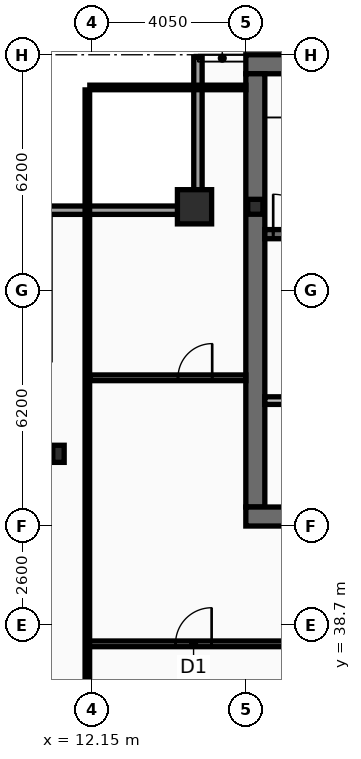
"""IFC4 building model, lengths in metres.
Left out: names, types, materials, properties, quantities, classifications, styles, units other than length and angle.
Written with IfcOpenShell. Run it as: python <this file> out.ifc"""

import sys

from ifc_helpers import new_model, si_unit, direction, frame, frame_2d, origin, origin_2d, place, context, subcontext, project, spatial, rectangle, hollow_rectangle, i_section, extrude, element, fill, save


model = new_model("IFC4")
c1 = context("Model", 3, precision=1e-05, world=origin(), true_north=direction((0.0, 1.0)))
c2 = subcontext(c1, "Body", "Model", "MODEL_VIEW")
j1 = project(units=[si_unit("LENGTHUNIT", "METRE"), si_unit("PLANEANGLEUNIT", "RADIAN")], contexts=[c1])
p1 = place(None, origin())
s1 = spatial("IfcSite", under=j1, at=p1, CompositionType="ELEMENT")
p2 = place(p1, origin())
s2 = spatial("IfcBuilding", under=s1, at=p2, CompositionType="ELEMENT")
p3 = place(p2, frame((0.0, 0.0, 339.8)))
s3 = spatial("IfcBuildingStorey", under=s2, at=p3, CompositionType="ELEMENT", Elevation=339.8)
p4 = place(p3, frame((16.2, 53.45, 0.0), z_axis=(0.0, 0.0, 1.0), x_axis=(1.0, 0.0, 0.0)))
e1 = element("IfcWall", 1, at=p4, inside=s3, PredefinedType="SHEAR", context=c2, shape_type="SweptSolid", body=[
    extrude(rectangle(XDim=40.5, YDim=0.5, at=frame_2d((20.25, 0.0))), origin(), (0.0, 0.0, 1.0), 3.44),
])
p5 = place(p3, frame((16.45, 41.8, 0.0), z_axis=(0.0, 0.0, 1.0), x_axis=(0.0, 1.0, 0.0)))
e2 = element("IfcWall", 2, at=p5, inside=s3, PredefinedType="SHEAR", context=c2, shape_type="SweptSolid", body=[
    extrude(rectangle(XDim=11.4, YDim=0.5, at=frame_2d((5.7, 0.0))), origin(), (0.0, 0.0, 1.0), 3.44),
])
p6 = place(p3, frame((18.65, 41.55, 0.0), z_axis=(0.0, 0.0, 1.0), x_axis=(-1.0, 0.0, 0.0)))
e3 = element("IfcWall", 3, at=p6, inside=s3, PredefinedType="SHEAR", context=c2, shape_type="SweptSolid", body=[
    extrude(rectangle(XDim=2.45, YDim=0.5, at=frame_2d((1.225, 0.0))), origin(), (0.0, 0.0, 1.0), 3.44),
])
p7 = place(p3, frame((16.7, 48.98, 0.0), z_axis=(0.0, 0.0, 1.0), x_axis=(1.0, 0.0, 0.0)))
e4 = element("IfcWall", 4, at=p7, inside=s3, PredefinedType="SHEAR", context=c2, shape_type="SweptSolid", body=[
    extrude(rectangle(XDim=7.52, YDim=0.24, at=frame_2d((3.76, 0.0))), origin(), (0.0, 0.0, 1.0), 3.44),
])
p8 = place(p7, frame((0.22, 0.0, 0.0)))
e5 = element("IfcOpeningElement", 5, at=p8, cuts=e4, PredefinedType="OPENING", context=c2, shape_type="SweptSolid", body=[
    extrude(rectangle(XDim=1.05, YDim=2.15, at=frame_2d((0.525, 1.075))), frame((0.0, 0.13, 0.0), z_axis=(0.0, -1.0, 0.0), x_axis=(1.0, 0.0, 0.0)), (0.0, 0.0, 1.0), 0.26),
])
p9 = place(p3, frame((14.85, 49.7, 0.0), z_axis=(0.0, 0.0, 1.0), x_axis=(1.0, 0.0, 0.0)))
e6 = element("IfcColumn", 6, at=p9, inside=s3, PredefinedType="COLUMN", context=c2, shape_type="SweptSolid", body=[
    extrude(hollow_rectangle(XDim=0.9, YDim=0.9, WallThickness=0.05, at=origin_2d()), origin(), (0.0, 0.0, 1.0), 3.6),
])
p10 = place(p3, frame((11.27, 43.2, 0.0), z_axis=(0.0, 0.0, 1.0), x_axis=(1.0, 0.0, 0.0)))
e7 = element("IfcColumn", 7, at=p10, inside=s3, PredefinedType="COLUMN", context=c2, shape_type="SweptSolid", body=[
    extrude(i_section(OverallWidth=0.3, OverallDepth=0.45, WebThickness=0.014, FlangeThickness=0.026, at=origin_2d()), origin(), (0.0, 0.0, 1.0), 3.6),
])
p11 = place(p3, frame((16.45, 49.7, 0.0), z_axis=(0.0, 0.0, 1.0), x_axis=(1.0, 0.0, 0.0)))
e8 = element("IfcColumn", 8, at=p11, inside=s3, PredefinedType="COLUMN", context=c2, shape_type="SweptSolid", body=[
    extrude(i_section(OverallWidth=0.399, OverallDepth=0.393, WebThickness=0.023, FlangeThickness=0.037, at=origin_2d()), origin(), (0.0, 0.0, 1.0), 3.6),
])
p12 = place(p3, frame((10.83, 49.61, 0.0), z_axis=(0.0, 0.0, 1.0), x_axis=(1.0, 0.0, 0.0)))
e9 = element("IfcWall", 9, at=p12, inside=s3, PredefinedType="SOLIDWALL", context=c2, shape_type="SweptSolid", body=[
    extrude(rectangle(XDim=4.22, YDim=0.22, at=frame_2d((2.11, 0.0))), origin(), (0.0, 0.0, 1.0), 2.88),
])
p13 = place(p3, frame((14.94, 49.72, 0.0), z_axis=(0.0, 0.0, 1.0), x_axis=(0.0, 1.0, 0.0)))
e10 = element("IfcWall", 10, at=p13, inside=s3, PredefinedType="SOLIDWALL", context=c2, shape_type="SweptSolid", body=[
    extrude(rectangle(XDim=3.91, YDim=0.22, at=frame_2d((1.955, 0.0))), origin(), (0.0, 0.0, 1.0), 2.88),
])
p14 = place(p3, frame((16.7, 44.6, 0.0), z_axis=(0.0, 0.0, 1.0), x_axis=(1.0, 0.0, 0.0)))
e11 = element("IfcWall", 11, at=p14, inside=s3, PredefinedType="PARTITIONING", context=c2, shape_type="SweptSolid", body=[
    extrude(rectangle(XDim=4.3, YDim=0.2, at=frame_2d((2.15, 0.0))), origin(), (0.0, 0.0, 1.0), 3.44),
])
p15 = place(p14, frame((1.25, 0.0, 0.0)))
e12 = element("IfcOpeningElement", 12, at=p15, cuts=e11, PredefinedType="OPENING", context=c2, shape_type="SweptSolid", body=[
    extrude(rectangle(XDim=1.05, YDim=2.15, at=frame_2d((0.525, 1.075))), frame((0.0, 0.11, 0.0), z_axis=(0.0, -1.0, 0.0), x_axis=(1.0, 0.0, 0.0)), (0.0, 0.0, 1.0), 0.22),
])
p16 = place(p3, frame((12.03, 38.2, 0.0), z_axis=(0.0, 0.0, 1.0), x_axis=(1.0, 0.0, 0.0)))
e13 = element("IfcWall", 13, at=p16, inside=s3, PredefinedType="PARTITIONING", context=c2, shape_type="SweptSolid", body=[
    extrude(rectangle(XDim=6.52, YDim=0.15, at=frame_2d((3.26, 0.0))), origin(), (0.0, 0.0, 1.0), 2.83),
])
p17 = place(p16, frame((2.32, 0.0, 0.0)))
e14 = element("IfcOpeningElement", 14, at=p17, cuts=e13, PredefinedType="OPENING", context=c2, shape_type="SweptSolid", body=[
    extrude(rectangle(XDim=0.95, YDim=2.05, at=frame_2d((0.475, 1.025))), frame((0.0, 0.085, 0.0), z_axis=(0.0, -1.0, 0.0), x_axis=(1.0, 0.0, 0.0)), (0.0, 0.0, 1.0), 0.17),
])
p18 = place(p3, frame((12.095, 45.2, 0.0), z_axis=(0.0, 0.0, 1.0), x_axis=(1.0, 0.0, 0.0)))
e15 = element("IfcWall", 15, at=p18, inside=s3, PredefinedType="PARTITIONING", context=c2, shape_type="SweptSolid", body=[
    extrude(rectangle(XDim=4.105, YDim=0.15, at=frame_2d((2.052, 0.0))), origin(), (0.0, 0.0, 1.0), 2.88),
])
p19 = place(p18, frame((2.32, 0.0, 0.0)))
e16 = element("IfcOpeningElement", 16, at=p19, cuts=e15, PredefinedType="OPENING", context=c2, shape_type="SweptSolid", body=[
    extrude(rectangle(XDim=0.9, YDim=2.05, at=frame_2d((0.45, 1.025))), frame((0.0, 0.085, 0.0), z_axis=(0.0, -1.0, 0.0), x_axis=(1.0, 0.0, 0.0)), (0.0, 0.0, 1.0), 0.17),
])
p20 = place(p3, frame((12.03, 10.665, 0.0), z_axis=(0.0, 0.0, 1.0), x_axis=(0.0, 1.0, 0.0)))
e17 = element("IfcWall", 17, at=p20, inside=s3, PredefinedType="PARTITIONING", context=c2, shape_type="SweptSolid", body=[
    extrude(rectangle(XDim=42.11, YDim=0.12, at=frame_2d((21.055, 0.0))), origin(), (0.0, 0.0, 1.0), 2.83),
])
p21 = place(p3, frame((12.095, 52.84, 0.0), z_axis=(0.0, 0.0, 1.0), x_axis=(1.0, 0.0, 0.0)))
e18 = element("IfcWall", 18, at=p21, inside=s3, PredefinedType="PARTITIONING", context=c2, shape_type="SweptSolid", body=[
    extrude(rectangle(XDim=4.105, YDim=0.12, at=frame_2d((2.052, 0.0))), origin(), (0.0, 0.0, 1.0), 3.44),
])
p22 = place(p8, origin())
e19 = element("IfcDoor", 19, at=p22, inside=s3, OperationType="SINGLE_SWING_LEFT", PredefinedType="DOOR", context=c2, shape_type="SweptSolid", body=[
    extrude(rectangle(XDim=1.05, YDim=2.15, at=frame_2d((0.525, 1.075))), frame((0.0, 0.025, 0.0), z_axis=(0.0, -1.0, 0.0), x_axis=(1.0, 0.0, 0.0)), (0.0, 0.0, 1.0), 0.05),
])
fill(e5, e19)
p23 = place(p17, origin())
e20 = element("IfcDoor", 20, at=p23, inside=s3, OperationType="SINGLE_SWING_RIGHT", PredefinedType="DOOR", context=c2, shape_type="SweptSolid", body=[
    extrude(rectangle(XDim=0.95, YDim=2.05, at=frame_2d((0.475, 1.025))), frame((0.0, 0.025, 0.0), z_axis=(0.0, -1.0, 0.0), x_axis=(1.0, 0.0, 0.0)), (0.0, 0.0, 1.0), 0.05),
])
fill(e14, e20)
p24 = place(p19, origin())
e21 = element("IfcDoor", 21, at=p24, inside=s3, OperationType="SINGLE_SWING_RIGHT", PredefinedType="DOOR", context=c2, shape_type="SweptSolid", body=[
    extrude(rectangle(XDim=0.9, YDim=2.05, at=frame_2d((0.45, 1.025))), frame((0.0, 0.025, 0.0), z_axis=(0.0, -1.0, 0.0), x_axis=(1.0, 0.0, 0.0)), (0.0, 0.0, 1.0), 0.05),
])
fill(e16, e21)
save(model, sys.argv[1])
